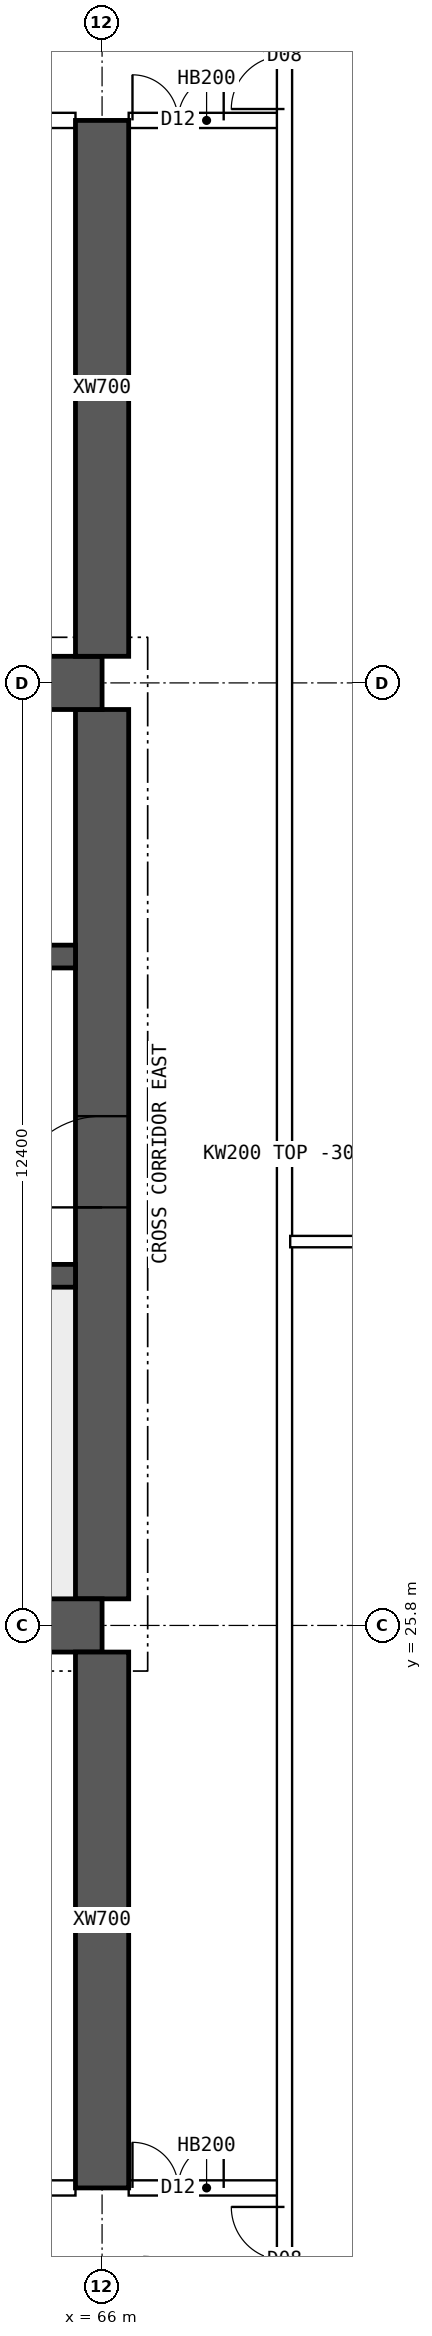
"""IFC4 building model, lengths in metres.
Left out: names, types, materials, properties, quantities, classifications, styles, units other than length and angle.
Written with IfcOpenShell. Run it as: python <this file> out.ifc"""

import sys

from ifc_helpers import new_model, si_unit, direction, frame, frame_2d, origin, place, context, subcontext, project, spatial, polyline, rectangle, outline, extrude, element, fill, save


model = new_model("IFC4")
c1 = context("Model", 3, precision=1e-05, world=origin(), true_north=direction((0.0, 1.0)))
c2 = subcontext(c1, "Body", "Model", "MODEL_VIEW")
j1 = project(units=[si_unit("LENGTHUNIT", "METRE"), si_unit("PLANEANGLEUNIT", "RADIAN")], contexts=[c1])
p1 = place(None, origin())
s1 = spatial("IfcSite", under=j1, at=p1, CompositionType="ELEMENT")
p2 = place(p1, origin())
s2 = spatial("IfcBuilding", under=s1, at=p2, CompositionType="ELEMENT")
p3 = place(p2, frame((0.0, 0.0, 254.05)))
s3 = spatial("IfcBuildingStorey", under=s2, at=p3, CompositionType="ELEMENT", Elevation=254.05)
for number, where, z_axis, x_axis in (
    (1, (18.0, 25.8, 0.0), (0.0, 0.0, 1.0), (1.0, 0.0, 0.0)),
    (2, (18.0, 38.2, 0.0), (0.0, 0.0, 1.0), (1.0, 0.0, 0.0)),
):
    element("IfcWall", number, at=place(p3, frame(where, z_axis=z_axis, x_axis=x_axis)), inside=s3, PredefinedType="SHEAR", context=c2, shape_type="SweptSolid", body=[
        extrude(rectangle(XDim=48.0, YDim=0.7, at=frame_2d((24.0, 0.0))), origin(), (0.0, 0.0, 1.0), 3.75),
    ])
p4 = place(p3, frame((66.0, 26.15, 0.0), z_axis=(0.0, 0.0, 1.0), x_axis=(0.0, 1.0, 0.0)))
e3 = element("IfcWall", 3, at=p4, inside=s3, PredefinedType="SHEAR", context=c2, shape_type="SweptSolid", body=[
    extrude(rectangle(XDim=11.7, YDim=0.7, at=frame_2d((5.85, 0.0))), origin(), (0.0, 0.0, 1.0), 3.75),
])
p5 = place(p4, frame((5.15, 0.0, 0.0)))
e4 = element("IfcOpeningElement", 4, at=p5, cuts=e3, PredefinedType="OPENING", context=c2, shape_type="SweptSolid", body=[
    extrude(rectangle(XDim=1.2, YDim=2.1, at=frame_2d((0.6, 1.05))), frame((0.0, 0.36, 0.0), z_axis=(0.0, -1.0, 0.0), x_axis=(1.0, 0.0, 0.0)), (0.0, 0.0, 1.0), 0.72),
])
p6 = place(p3, frame((18.35, 30.4, 0.0), z_axis=(0.0, 0.0, 1.0), x_axis=(1.0, 0.0, 0.0)))
e5 = element("IfcWall", 5, at=p6, inside=s3, PredefinedType="SHEAR", context=c2, shape_type="SweptSolid", body=[
    extrude(rectangle(XDim=47.3, YDim=0.3, at=frame_2d((23.65, 0.0))), origin(), (0.0, 0.0, 1.0), 3.75),
])
p7 = place(p6, frame((0.4, 0.0, 0.0)))
e6 = element("IfcOpeningElement", 6, at=p7, cuts=e5, PredefinedType="OPENING", context=c2, shape_type="SweptSolid", body=[
    extrude(rectangle(XDim=1.0, YDim=2.1, at=frame_2d((0.5, 1.05))), frame((0.0, 0.16, 0.0), z_axis=(0.0, -1.0, 0.0), x_axis=(1.0, 0.0, 0.0)), (0.0, 0.0, 1.0), 0.32),
])
p8 = place(p6, frame((45.9, 0.0, 0.0)))
e7 = element("IfcOpeningElement", 7, at=p8, cuts=e5, PredefinedType="OPENING", context=c2, shape_type="SweptSolid", body=[
    extrude(rectangle(XDim=1.0, YDim=2.1, at=frame_2d((0.5, 1.05))), frame((0.0, 0.16, 0.0), z_axis=(0.0, -1.0, 0.0), x_axis=(1.0, 0.0, 0.0)), (0.0, 0.0, 1.0), 0.32),
])
p9 = place(p6, frame((8.4, 0.0, 0.0)))
e8 = element("IfcOpeningElement", 8, at=p9, cuts=e5, PredefinedType="OPENING", context=c2, shape_type="SweptSolid", body=[
    extrude(rectangle(XDim=1.1, YDim=2.1, at=frame_2d((0.55, 1.05))), frame((0.0, 0.16, 0.0), z_axis=(0.0, -1.0, 0.0), x_axis=(1.0, 0.0, 0.0)), (0.0, 0.0, 1.0), 0.32),
])
p10 = place(p6, frame((11.0, 0.0, 0.0)))
e9 = element("IfcOpeningElement", 9, at=p10, cuts=e5, PredefinedType="OPENING", context=c2, shape_type="SweptSolid", body=[
    extrude(rectangle(XDim=1.1, YDim=2.1, at=frame_2d((0.55, 1.05))), frame((0.0, 0.16, 0.0), z_axis=(0.0, -1.0, 0.0), x_axis=(1.0, 0.0, 0.0)), (0.0, 0.0, 1.0), 0.32),
])
p11 = place(p6, frame((13.6, 0.0, 0.0)))
e10 = element("IfcOpeningElement", 10, at=p11, cuts=e5, PredefinedType="OPENING", context=c2, shape_type="SweptSolid", body=[
    extrude(rectangle(XDim=1.1, YDim=2.1, at=frame_2d((0.55, 1.05))), frame((0.0, 0.16, 0.0), z_axis=(0.0, -1.0, 0.0), x_axis=(1.0, 0.0, 0.0)), (0.0, 0.0, 1.0), 0.32),
])
p12 = place(p6, frame((16.2, 0.0, 0.0)))
e11 = element("IfcOpeningElement", 11, at=p12, cuts=e5, PredefinedType="OPENING", context=c2, shape_type="SweptSolid", body=[
    extrude(rectangle(XDim=1.1, YDim=2.1, at=frame_2d((0.55, 1.05))), frame((0.0, 0.16, 0.0), z_axis=(0.0, -1.0, 0.0), x_axis=(1.0, 0.0, 0.0)), (0.0, 0.0, 1.0), 0.32),
])
p13 = place(p6, frame((18.975, 0.0, 0.0)))
e12 = element("IfcOpeningElement", 12, at=p13, cuts=e5, PredefinedType="OPENING", context=c2, shape_type="SweptSolid", body=[
    extrude(rectangle(XDim=0.9, YDim=2.1, at=frame_2d((0.45, 1.05))), frame((0.0, 0.16, 0.0), z_axis=(0.0, -1.0, 0.0), x_axis=(1.0, 0.0, 0.0)), (0.0, 0.0, 1.0), 0.32),
])
p14 = place(p6, frame((24.475, 0.0, 0.0)))
e13 = element("IfcOpeningElement", 13, at=p14, cuts=e5, PredefinedType="OPENING", context=c2, shape_type="SweptSolid", body=[
    extrude(rectangle(XDim=0.9, YDim=2.1, at=frame_2d((0.45, 1.05))), frame((0.0, 0.16, 0.0), z_axis=(0.0, -1.0, 0.0), x_axis=(1.0, 0.0, 0.0)), (0.0, 0.0, 1.0), 0.32),
])
p15 = place(p6, frame((30.267, 0.0, 0.0)))
e14 = element("IfcOpeningElement", 14, at=p15, cuts=e5, PredefinedType="OPENING", context=c2, shape_type="SweptSolid", body=[
    extrude(rectangle(XDim=1.1, YDim=2.1, at=frame_2d((0.55, 1.05))), frame((0.0, 0.16, 0.0), z_axis=(0.0, -1.0, 0.0), x_axis=(1.0, 0.0, 0.0)), (0.0, 0.0, 1.0), 0.32),
])
p16 = place(p6, frame((33.8, 0.0, 0.0)))
e15 = element("IfcOpeningElement", 15, at=p16, cuts=e5, PredefinedType="OPENING", context=c2, shape_type="SweptSolid", body=[
    extrude(rectangle(XDim=1.1, YDim=2.1, at=frame_2d((0.55, 1.05))), frame((0.0, 0.16, 0.0), z_axis=(0.0, -1.0, 0.0), x_axis=(1.0, 0.0, 0.0)), (0.0, 0.0, 1.0), 0.32),
])
p17 = place(p6, frame((37.333, 0.0, 0.0)))
e16 = element("IfcOpeningElement", 16, at=p17, cuts=e5, PredefinedType="OPENING", context=c2, shape_type="SweptSolid", body=[
    extrude(rectangle(XDim=1.1, YDim=2.1, at=frame_2d((0.55, 1.05))), frame((0.0, 0.16, 0.0), z_axis=(0.0, -1.0, 0.0), x_axis=(1.0, 0.0, 0.0)), (0.0, 0.0, 1.0), 0.32),
])
p18 = place(p3, frame((18.35, 34.6, 0.0), z_axis=(0.0, 0.0, 1.0), x_axis=(1.0, 0.0, 0.0)))
e17 = element("IfcWall", 17, at=p18, inside=s3, PredefinedType="SHEAR", context=c2, shape_type="SweptSolid", body=[
    extrude(rectangle(XDim=47.3, YDim=0.3, at=frame_2d((23.65, 0.0))), origin(), (0.0, 0.0, 1.0), 3.75),
])
p19 = place(p18, frame((0.9, 0.0, 0.0)))
e18 = element("IfcOpeningElement", 18, at=p19, cuts=e17, PredefinedType="OPENING", context=c2, shape_type="SweptSolid", body=[
    extrude(rectangle(XDim=1.1, YDim=2.1, at=frame_2d((0.55, 1.05))), frame((0.0, 0.16, 0.0), z_axis=(0.0, -1.0, 0.0), x_axis=(1.0, 0.0, 0.0)), (0.0, 0.0, 1.0), 0.32),
])
p20 = place(p18, frame((45.3, 0.0, 0.0)))
e19 = element("IfcOpeningElement", 19, at=p20, cuts=e17, PredefinedType="OPENING", context=c2, shape_type="SweptSolid", body=[
    extrude(rectangle(XDim=1.1, YDim=2.1, at=frame_2d((0.55, 1.05))), frame((0.0, 0.16, 0.0), z_axis=(0.0, -1.0, 0.0), x_axis=(1.0, 0.0, 0.0)), (0.0, 0.0, 1.0), 0.32),
])
p21 = place(p18, frame((4.25, 0.0, 0.0)))
e20 = element("IfcOpeningElement", 20, at=p21, cuts=e17, PredefinedType="OPENING", context=c2, shape_type="SweptSolid", body=[
    extrude(rectangle(XDim=0.9, YDim=2.1, at=frame_2d((0.45, 1.05))), frame((0.0, 0.16, 0.0), z_axis=(0.0, -1.0, 0.0), x_axis=(1.0, 0.0, 0.0)), (0.0, 0.0, 1.0), 0.32),
])
p22 = place(p18, frame((42.15, 0.0, 0.0)))
e21 = element("IfcOpeningElement", 21, at=p22, cuts=e17, PredefinedType="OPENING", context=c2, shape_type="SweptSolid", body=[
    extrude(rectangle(XDim=0.9, YDim=2.1, at=frame_2d((0.45, 1.05))), frame((0.0, 0.16, 0.0), z_axis=(0.0, -1.0, 0.0), x_axis=(1.0, 0.0, 0.0)), (0.0, 0.0, 1.0), 0.32),
])
p23 = place(p18, frame((9.025, 0.0, 0.0)))
e22 = element("IfcOpeningElement", 22, at=p23, cuts=e17, PredefinedType="OPENING", context=c2, shape_type="SweptSolid", body=[
    extrude(rectangle(XDim=0.9, YDim=2.1, at=frame_2d((0.45, 1.05))), frame((0.0, 0.16, 0.0), z_axis=(0.0, -1.0, 0.0), x_axis=(1.0, 0.0, 0.0)), (0.0, 0.0, 1.0), 0.32),
])
p24 = place(p18, frame((12.999, 0.0, 0.0)))
e23 = element("IfcOpeningElement", 23, at=p24, cuts=e17, PredefinedType="OPENING", context=c2, shape_type="SweptSolid", body=[
    extrude(rectangle(XDim=0.9, YDim=2.1, at=frame_2d((0.45, 1.05))), frame((0.0, 0.16, 0.0), z_axis=(0.0, -1.0, 0.0), x_axis=(1.0, 0.0, 0.0)), (0.0, 0.0, 1.0), 0.32),
])
p25 = place(p18, frame((16.646, 0.0, 0.0)))
e24 = element("IfcOpeningElement", 24, at=p25, cuts=e17, PredefinedType="OPENING", context=c2, shape_type="SweptSolid", body=[
    extrude(rectangle(XDim=0.9, YDim=2.1, at=frame_2d((0.45, 1.05))), frame((0.0, 0.16, 0.0), z_axis=(0.0, -1.0, 0.0), x_axis=(1.0, 0.0, 0.0)), (0.0, 0.0, 1.0), 0.32),
])
p26 = place(p18, frame((20.405, 0.0, 0.0)))
e25 = element("IfcOpeningElement", 25, at=p26, cuts=e17, PredefinedType="OPENING", context=c2, shape_type="SweptSolid", body=[
    extrude(rectangle(XDim=0.9, YDim=2.1, at=frame_2d((0.45, 1.05))), frame((0.0, 0.16, 0.0), z_axis=(0.0, -1.0, 0.0), x_axis=(1.0, 0.0, 0.0)), (0.0, 0.0, 1.0), 0.32),
])
p27 = place(p18, frame((24.811, 0.0, 0.0)))
e26 = element("IfcOpeningElement", 26, at=p27, cuts=e17, PredefinedType="OPENING", context=c2, shape_type="SweptSolid", body=[
    extrude(rectangle(XDim=0.9, YDim=2.1, at=frame_2d((0.45, 1.05))), frame((0.0, 0.16, 0.0), z_axis=(0.0, -1.0, 0.0), x_axis=(1.0, 0.0, 0.0)), (0.0, 0.0, 1.0), 0.32),
])
p28 = place(p18, frame((27.608, 0.0, 0.0)))
e27 = element("IfcOpeningElement", 27, at=p28, cuts=e17, PredefinedType="OPENING", context=c2, shape_type="SweptSolid", body=[
    extrude(rectangle(XDim=0.9, YDim=2.1, at=frame_2d((0.45, 1.05))), frame((0.0, 0.16, 0.0), z_axis=(0.0, -1.0, 0.0), x_axis=(1.0, 0.0, 0.0)), (0.0, 0.0, 1.0), 0.32),
])
p29 = place(p18, frame((29.981, 0.0, 0.0)))
e28 = element("IfcOpeningElement", 28, at=p29, cuts=e17, PredefinedType="OPENING", context=c2, shape_type="SweptSolid", body=[
    extrude(rectangle(XDim=0.9, YDim=2.1, at=frame_2d((0.45, 1.05))), frame((0.0, 0.16, 0.0), z_axis=(0.0, -1.0, 0.0), x_axis=(1.0, 0.0, 0.0)), (0.0, 0.0, 1.0), 0.32),
])
p30 = place(p18, frame((35.451, 0.0, 0.0)))
e29 = element("IfcOpeningElement", 29, at=p30, cuts=e17, PredefinedType="OPENING", context=c2, shape_type="SweptSolid", body=[
    extrude(rectangle(XDim=0.9, YDim=2.1, at=frame_2d((0.45, 1.05))), frame((0.0, 0.16, 0.0), z_axis=(0.0, -1.0, 0.0), x_axis=(1.0, 0.0, 0.0)), (0.0, 0.0, 1.0), 0.32),
])
for number, where, z_axis, x_axis in (
    (30, (66.0, 18.4, 0.0), (0.0, 0.0, 1.0), (0.0, 1.0, 0.0)),
    (31, (66.0, 38.55, 0.0), (0.0, 0.0, 1.0), (0.0, 1.0, 0.0)),
):
    element("IfcWall", number, at=place(p3, frame(where, z_axis=z_axis, x_axis=x_axis)), inside=s3, PredefinedType="SHEAR", context=c2, shape_type="SweptSolid", body=[
        extrude(rectangle(XDim=7.05, YDim=0.7, at=frame_2d((3.525, 0.0))), origin(), (0.0, 0.0, 1.0), 3.75),
    ])
p31 = place(p3, frame((60.35, 18.4, 0.0), z_axis=(0.0, 0.0, 1.0), x_axis=(1.0, 0.0, 0.0)))
e32 = element("IfcWall", 32, at=p31, inside=s3, PredefinedType="SOLIDWALL", context=c2, shape_type="SweptSolid", body=[
    extrude(rectangle(XDim=5.3, YDim=0.2, at=frame_2d((2.65, 0.0))), origin(), (0.0, 0.0, 1.0), 3.45),
])
p32 = place(p31, frame((0.525, 0.0, 0.0)))
e33 = element("IfcOpeningElement", 33, at=p32, cuts=e32, PredefinedType="OPENING", context=c2, shape_type="SweptSolid", body=[
    extrude(rectangle(XDim=1.0, YDim=2.1, at=frame_2d((0.5, 1.05))), frame((0.0, 0.11, 0.0), z_axis=(0.0, -1.0, 0.0), x_axis=(1.0, 0.0, 0.0)), (0.0, 0.0, 1.0), 0.22),
])
p33 = place(p3, frame((66.35, 18.4, 0.0), z_axis=(0.0, 0.0, 1.0), x_axis=(1.0, 0.0, 0.0)))
e34 = element("IfcWall", 34, at=p33, inside=s3, PredefinedType="SOLIDWALL", context=c2, shape_type="SweptSolid", body=[
    extrude(rectangle(XDim=2.05, YDim=0.2, at=frame_2d((1.025, 0.0))), origin(), (0.0, 0.0, 1.0), 3.45),
])
p34 = place(p33, frame((0.05, 0.0, 0.0)))
e35 = element("IfcOpeningElement", 35, at=p34, cuts=e34, PredefinedType="OPENING", context=c2, shape_type="SweptSolid", body=[
    extrude(rectangle(XDim=1.2, YDim=2.1, at=frame_2d((0.6, 1.05))), frame((0.0, 0.11, 0.0), z_axis=(0.0, -1.0, 0.0), x_axis=(1.0, 0.0, 0.0)), (0.0, 0.0, 1.0), 0.22),
])
p35 = place(p3, frame((60.35, 45.6, 0.0), z_axis=(0.0, 0.0, 1.0), x_axis=(1.0, 0.0, 0.0)))
e36 = element("IfcWall", 36, at=p35, inside=s3, PredefinedType="SOLIDWALL", context=c2, shape_type="SweptSolid", body=[
    extrude(rectangle(XDim=5.3, YDim=0.2, at=frame_2d((2.65, 0.0))), origin(), (0.0, 0.0, 1.0), 3.45),
])
p36 = place(p35, frame((0.525, 0.0, 0.0)))
e37 = element("IfcOpeningElement", 37, at=p36, cuts=e36, PredefinedType="OPENING", context=c2, shape_type="SweptSolid", body=[
    extrude(rectangle(XDim=1.0, YDim=2.1, at=frame_2d((0.5, 1.05))), frame((0.0, 0.11, 0.0), z_axis=(0.0, -1.0, 0.0), x_axis=(1.0, 0.0, 0.0)), (0.0, 0.0, 1.0), 0.22),
])
p37 = place(p3, frame((66.35, 45.6, 0.0), z_axis=(0.0, 0.0, 1.0), x_axis=(1.0, 0.0, 0.0)))
e38 = element("IfcWall", 38, at=p37, inside=s3, PredefinedType="SOLIDWALL", context=c2, shape_type="SweptSolid", body=[
    extrude(rectangle(XDim=2.05, YDim=0.2, at=frame_2d((1.025, 0.0))), origin(), (0.0, 0.0, 1.0), 3.45),
])
p38 = place(p37, frame((0.05, 0.0, 0.0)))
e39 = element("IfcOpeningElement", 39, at=p38, cuts=e38, PredefinedType="OPENING", context=c2, shape_type="SweptSolid", body=[
    extrude(rectangle(XDim=1.2, YDim=2.1, at=frame_2d((0.6, 1.05))), frame((0.0, 0.11, 0.0), z_axis=(0.0, -1.0, 0.0), x_axis=(1.0, 0.0, 0.0)), (0.0, 0.0, 1.0), 0.22),
])
p39 = place(p3, frame((68.475, 30.85, 0.0), z_axis=(0.0, 0.0, 1.0), x_axis=(1.0, 0.0, 0.0)))
e40 = element("IfcWall", 40, at=p39, inside=s3, PredefinedType="PARTITIONING", context=c2, shape_type="SweptSolid", body=[
    extrude(outline(polyline([(0.0, 0.0), (6.82, 0.0), (6.82, 3.45), (3.827, 3.45), (3.825, 3.0), (3.227, 3.0), (3.225, 3.45), (0.0, 3.45), (0.0, 0.0)])), frame((0.0, 0.075, 0.0), z_axis=(0.0, -1.0, 0.0), x_axis=(1.0, 0.0, 0.0)), (0.0, 0.0, 1.0), 0.15),
])
p40 = place(p3, frame((68.4, 11.646, 0.0), z_axis=(0.0, 0.0, 1.0), x_axis=(0.0, 1.0, 0.0)))
e41 = element("IfcWall", 41, at=p40, inside=s3, PredefinedType="SOLIDWALL", context=c2, shape_type="SweptSolid", body=[
    extrude(rectangle(XDim=40.708, YDim=0.2, at=frame_2d((20.354, 0.0))), origin(), (0.0, 0.0, 1.0), 3.45),
])
p41 = place(p40, frame((5.104, 0.0, 0.0)))
e42 = element("IfcOpeningElement", 42, at=p41, cuts=e41, PredefinedType="OPENING", context=c2, shape_type="SweptSolid", body=[
    extrude(rectangle(XDim=1.4, YDim=2.1, at=frame_2d((0.7, 1.05))), frame((0.0, 0.11, 0.0), z_axis=(0.0, -1.0, 0.0), x_axis=(1.0, 0.0, 0.0)), (0.0, 0.0, 1.0), 0.22),
])
p42 = place(p40, frame((34.104, 0.0, 0.0)))
e43 = element("IfcOpeningElement", 43, at=p42, cuts=e41, PredefinedType="OPENING", context=c2, shape_type="SweptSolid", body=[
    extrude(rectangle(XDim=1.4, YDim=2.1, at=frame_2d((0.7, 1.05))), frame((0.0, 0.11, 0.0), z_axis=(0.0, -1.0, 0.0), x_axis=(1.0, 0.0, 0.0)), (0.0, 0.0, 1.0), 0.22),
])
p43 = place(p5, origin())
e44 = element("IfcDoor", 44, at=p43, inside=s3, OperationType="SINGLE_SWING_LEFT", PredefinedType="DOOR", context=c2, shape_type="SweptSolid", body=[
    extrude(rectangle(XDim=1.2, YDim=2.1, at=frame_2d((0.6, 1.05))), frame((0.0, 0.025, 0.0), z_axis=(0.0, -1.0, 0.0), x_axis=(1.0, 0.0, 0.0)), (0.0, 0.0, 1.0), 0.05),
])
fill(e4, e44)
p44 = place(p34, origin())
e45 = element("IfcDoor", 45, at=p44, inside=s3, OperationType="DOUBLE_DOOR_SINGLE_SWING", PredefinedType="DOOR", context=c2, shape_type="SweptSolid", body=[
    extrude(rectangle(XDim=1.2, YDim=2.1, at=frame_2d((0.6, 1.05))), frame((0.0, 0.025, 0.0), z_axis=(0.0, -1.0, 0.0), x_axis=(1.0, 0.0, 0.0)), (0.0, 0.0, 1.0), 0.05),
])
fill(e35, e45)
p45 = place(p38, origin())
e46 = element("IfcDoor", 46, at=p45, inside=s3, OperationType="DOUBLE_DOOR_SINGLE_SWING", PredefinedType="DOOR", context=c2, shape_type="SweptSolid", body=[
    extrude(rectangle(XDim=1.2, YDim=2.1, at=frame_2d((0.6, 1.05))), frame((0.0, 0.025, 0.0), z_axis=(0.0, -1.0, 0.0), x_axis=(1.0, 0.0, 0.0)), (0.0, 0.0, 1.0), 0.05),
])
fill(e39, e46)
p46 = place(p41, origin())
e47 = element("IfcDoor", 47, at=p46, inside=s3, OperationType="DOUBLE_DOOR_SINGLE_SWING", PredefinedType="DOOR", context=c2, shape_type="SweptSolid", body=[
    extrude(rectangle(XDim=1.4, YDim=2.1, at=frame_2d((0.7, 1.05))), frame((0.0, 0.025, 0.0), z_axis=(0.0, -1.0, 0.0), x_axis=(1.0, 0.0, 0.0)), (0.0, 0.0, 1.0), 0.05),
])
fill(e42, e47)
p47 = place(p42, origin())
e48 = element("IfcDoor", 48, at=p47, inside=s3, OperationType="DOUBLE_DOOR_SINGLE_SWING", PredefinedType="DOOR", context=c2, shape_type="SweptSolid", body=[
    extrude(rectangle(XDim=1.4, YDim=2.1, at=frame_2d((0.7, 1.05))), frame((0.0, 0.025, 0.0), z_axis=(0.0, -1.0, 0.0), x_axis=(1.0, 0.0, 0.0)), (0.0, 0.0, 1.0), 0.05),
])
fill(e43, e48)
save(model, sys.argv[1])
